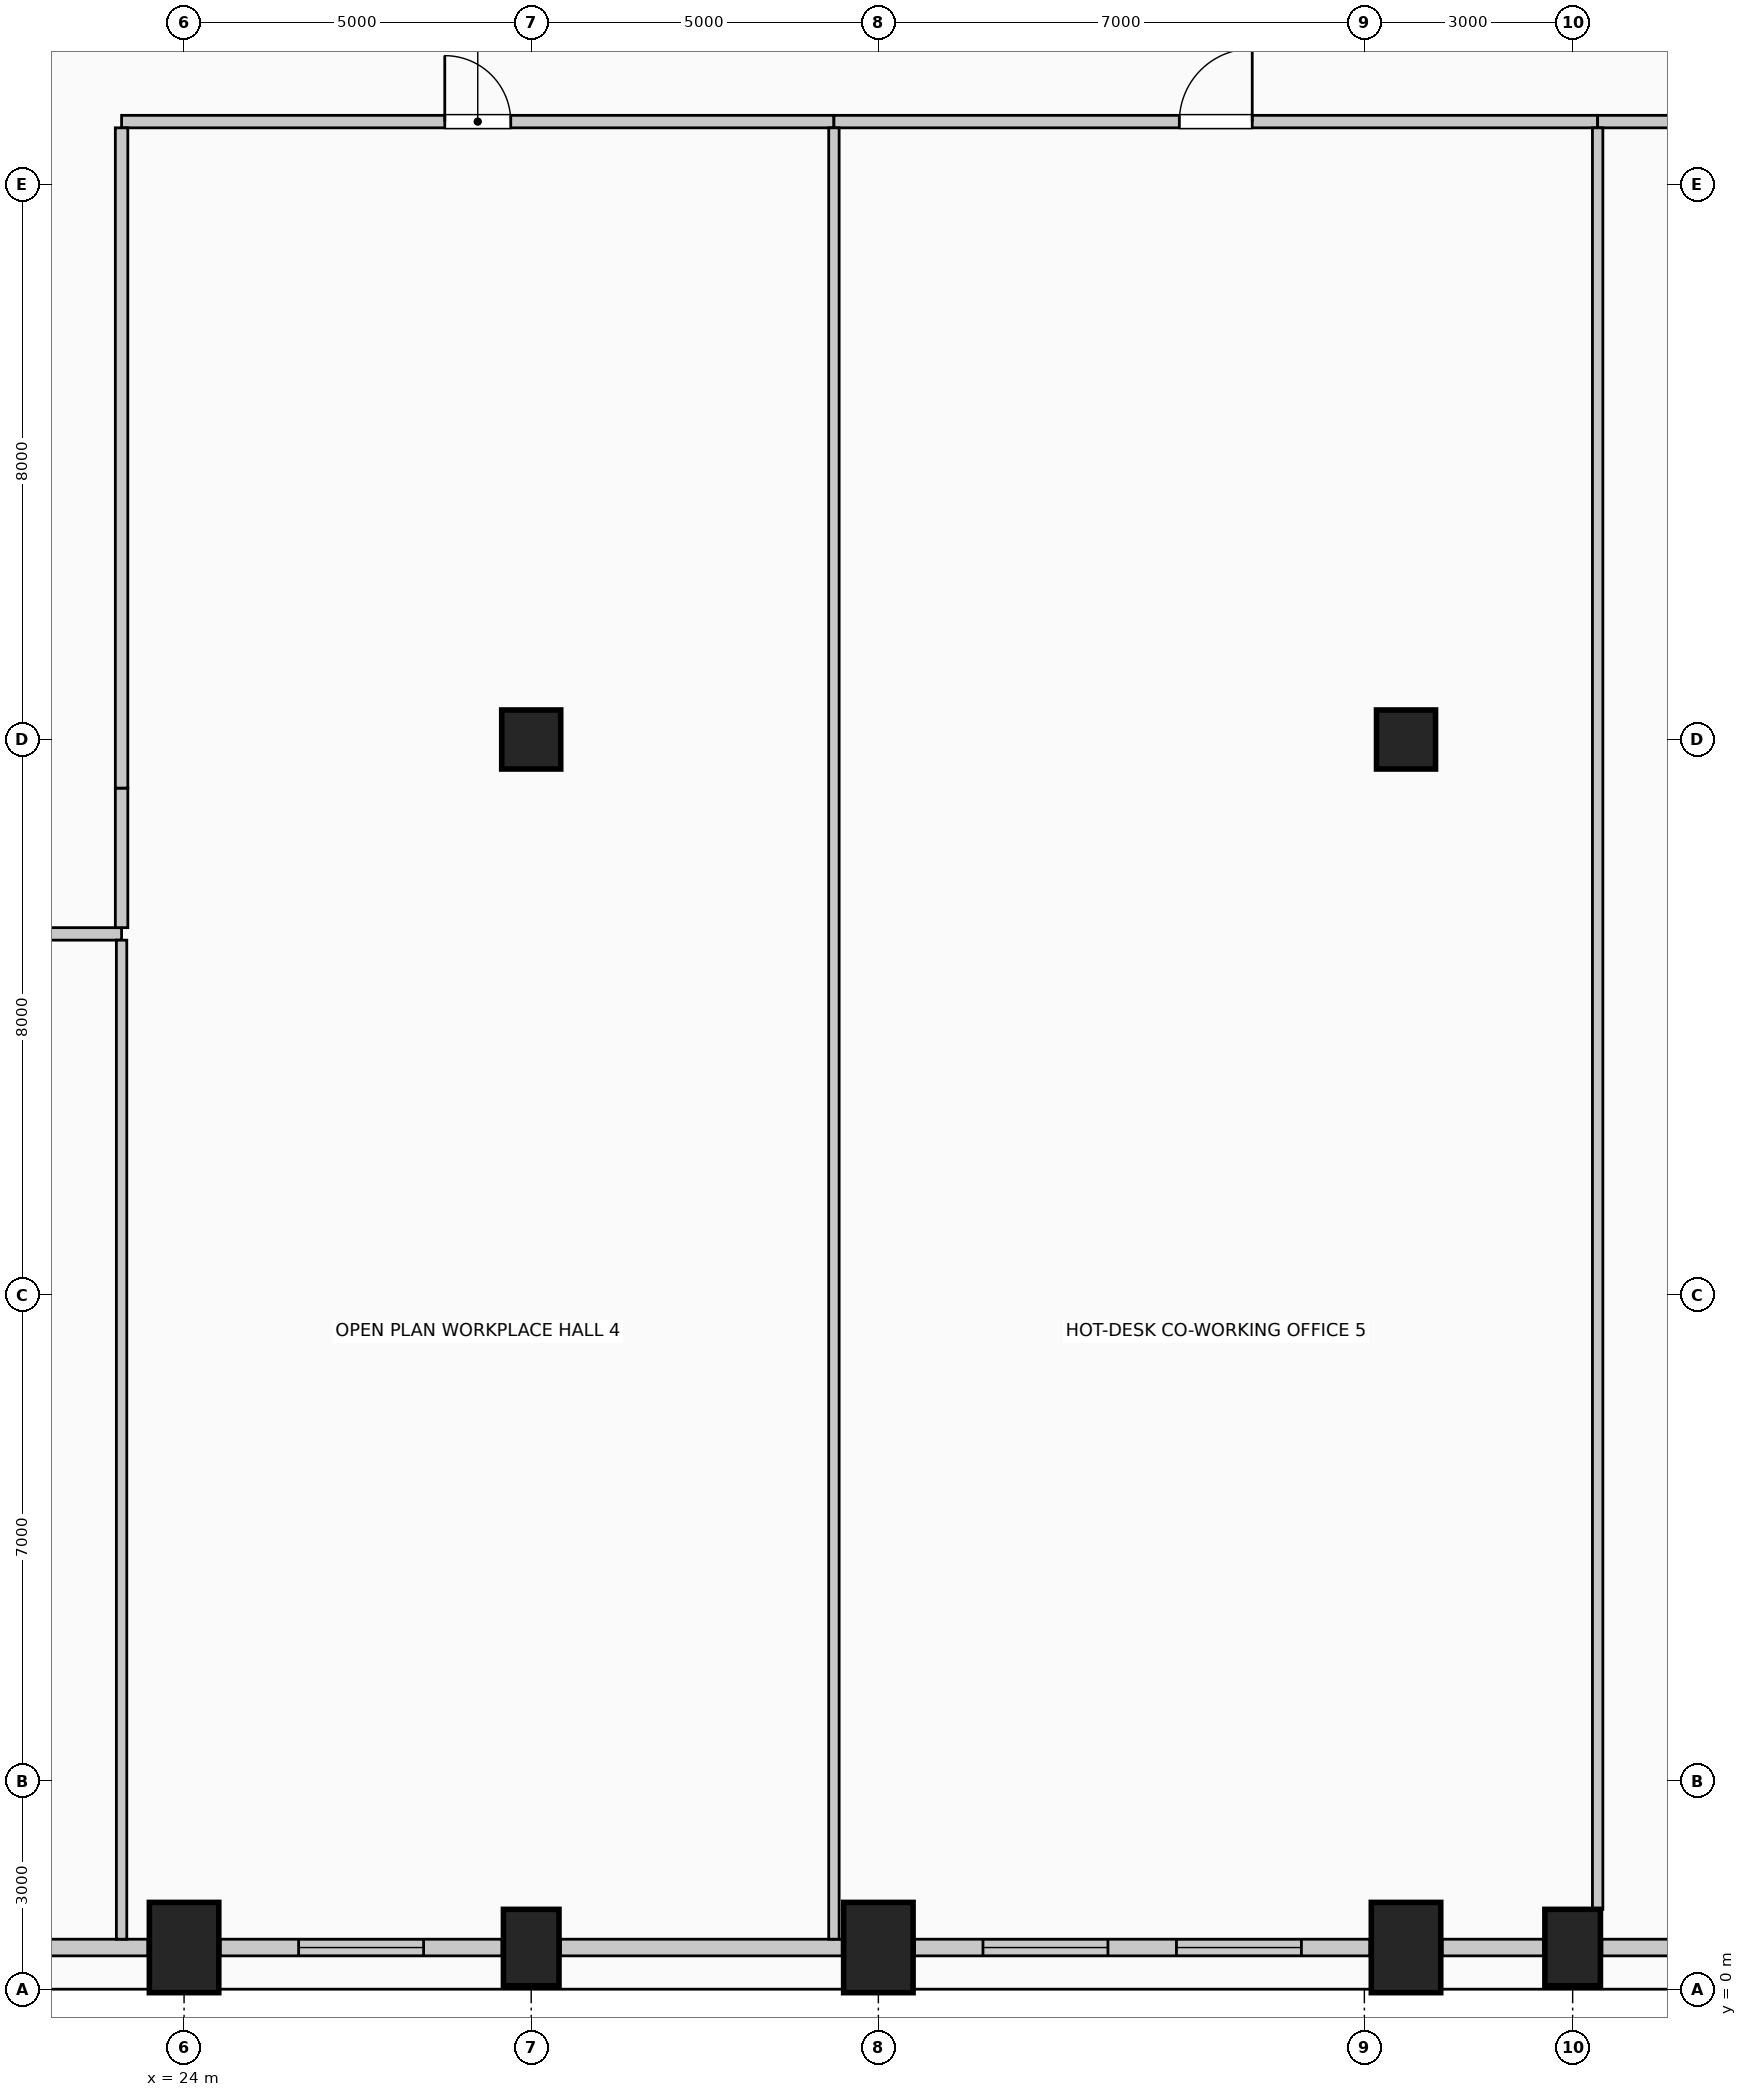
"""IFC4 building model, lengths in metres.
Left out: names, types, materials, properties, quantities, classifications, styles, units other than length and angle.
Written with IfcOpenShell. Run it as: python <this file> out.ifc"""

import sys

from ifc_helpers import new_model, si_unit, direction, frame, frame_2d, origin, origin_2d, place, context, subcontext, project, spatial, rectangle, circle, extrude, element, fill, save


model = new_model("IFC4")
c1 = context("Model", 3, precision=1e-05, world=origin(), true_north=direction((0.0, 1.0)))
c2 = subcontext(c1, "Body", "Model", "MODEL_VIEW")
j1 = project(units=[si_unit("LENGTHUNIT", "METRE"), si_unit("PLANEANGLEUNIT", "RADIAN")], contexts=[c1])
p1 = place(None, origin())
s1 = spatial("IfcSite", under=j1, at=p1, CompositionType="ELEMENT")
p2 = place(p1, origin())
s2 = spatial("IfcBuilding", under=s1, at=p2, CompositionType="ELEMENT")
p3 = place(p2, frame((0.0, 0.0, 174.6)))
s3 = spatial("IfcBuildingStorey", under=s2, at=p3, CompositionType="ELEMENT", Elevation=174.6)
p4 = place(p3, frame((24.0, 0.6, 0.0), z_axis=(0.0, 0.0, 1.0), x_axis=(1.0, 0.0, 0.0)))
e1 = element("IfcColumn", 1, at=p4, inside=s3, PredefinedType="COLUMN", context=c2, shape_type="SweptSolid", body=[
    extrude(rectangle(XDim=1.0, YDim=1.3, at=origin_2d()), origin(), (0.0, 0.0, 1.0), 4.0),
])
p5 = place(p3, frame((29.0, 0.6, 0.0), z_axis=(0.0, 0.0, 1.0), x_axis=(1.0, 0.0, 0.0)))
e2 = element("IfcColumn", 2, at=p5, inside=s3, PredefinedType="COLUMN", context=c2, shape_type="SweptSolid", body=[
    extrude(rectangle(XDim=0.8, YDim=1.1, at=origin_2d()), origin(), (0.0, 0.0, 1.0), 4.0),
])
for number, where, z_axis, x_axis in (
    (3, (34.0, 0.6, 0.0), (0.0, 0.0, 1.0), (1.0, 0.0, 0.0)),
    (4, (41.6, 0.6, 0.0), (0.0, 0.0, 1.0), (1.0, 0.0, 0.0)),
):
    element("IfcColumn", number, at=place(p3, frame(where, z_axis=z_axis, x_axis=x_axis)), inside=s3, PredefinedType="COLUMN", context=c2, shape_type="SweptSolid", body=[
        extrude(rectangle(XDim=1.0, YDim=1.3, at=origin_2d()), origin(), (0.0, 0.0, 1.0), 4.0),
    ])
p6 = place(p3, frame((44.0, 0.6, 0.0), z_axis=(0.0, 0.0, 1.0), x_axis=(1.0, 0.0, 0.0)))
e5 = element("IfcColumn", 5, at=p6, inside=s3, PredefinedType="COLUMN", context=c2, shape_type="SweptSolid", body=[
    extrude(rectangle(XDim=0.8, YDim=1.1, at=origin_2d()), origin(), (0.0, 0.0, 1.0), 4.0),
])
for number, where, z_axis, x_axis in (
    (6, (29.0, 18.0, 0.0), (0.0, 0.0, 1.0), (1.0, 0.0, 0.0)),
    (7, (41.6, 18.0, 0.0), (0.0, 0.0, 1.0), (1.0, 0.0, 0.0)),
):
    element("IfcColumn", number, at=place(p3, frame(where, z_axis=z_axis, x_axis=x_axis)), inside=s3, PredefinedType="COLUMN", context=c2, shape_type="SweptSolid", body=[
        extrude(circle(Radius=0.425, at=origin_2d()), origin(), (0.0, 0.0, 1.0), 4.0),
    ])
p7 = place(p3, frame((23.48, 0.6, 0.0), z_axis=(0.0, 0.0, 1.0), x_axis=(-1.0, 0.0, 0.0)))
e8 = element("IfcWall", 8, at=p7, inside=s3, PredefinedType="SOLIDWALL", context=c2, shape_type="SweptSolid", body=[
    extrude(rectangle(XDim=6.56, YDim=0.24, at=frame_2d((3.28, 0.0))), origin(), (0.0, 0.0, 1.0), 2.975),
])
p8 = place(p7, frame((3.773, 0.0, 0.42)))
e9 = element("IfcOpeningElement", 9, at=p8, cuts=e8, PredefinedType="OPENING", context=c2, shape_type="SweptSolid", body=[
    extrude(rectangle(XDim=1.8, YDim=2.2, at=frame_2d((0.9, 1.1))), frame((0.0, 0.13, 0.0), z_axis=(0.0, -1.0, 0.0), x_axis=(1.0, 0.0, 0.0)), (0.0, 0.0, 1.0), 0.26),
])
p9 = place(p3, frame((28.58, 0.6, 0.0), z_axis=(0.0, 0.0, 1.0), x_axis=(-1.0, 0.0, 0.0)))
e10 = element("IfcWall", 10, at=p9, inside=s3, PredefinedType="SOLIDWALL", context=c2, shape_type="SweptSolid", body=[
    extrude(rectangle(XDim=4.06, YDim=0.24, at=frame_2d((2.03, 0.0))), origin(), (0.0, 0.0, 1.0), 2.975),
])
p10 = place(p9, frame((1.13, 0.0, 0.42)))
e11 = element("IfcOpeningElement", 11, at=p10, cuts=e10, PredefinedType="OPENING", context=c2, shape_type="SweptSolid", body=[
    extrude(rectangle(XDim=1.8, YDim=2.2, at=frame_2d((0.9, 1.1))), frame((0.0, 0.13, 0.0), z_axis=(0.0, -1.0, 0.0), x_axis=(1.0, 0.0, 0.0)), (0.0, 0.0, 1.0), 0.26),
])
p11 = place(p3, frame((33.48, 0.6, 0.0), z_axis=(0.0, 0.0, 1.0), x_axis=(-1.0, 0.0, 0.0)))
e12 = element("IfcWall", 12, at=p11, inside=s3, PredefinedType="SOLIDWALL", context=c2, shape_type="SweptSolid", body=[
    extrude(rectangle(XDim=4.06, YDim=0.24, at=frame_2d((2.03, 0.0))), origin(), (0.0, 0.0, 1.0), 2.975),
])
p12 = place(p3, frame((41.08, 0.6, 0.0), z_axis=(0.0, 0.0, 1.0), x_axis=(-1.0, 0.0, 0.0)))
e13 = element("IfcWall", 13, at=p12, inside=s3, PredefinedType="SOLIDWALL", context=c2, shape_type="SweptSolid", body=[
    extrude(rectangle(XDim=6.56, YDim=0.24, at=frame_2d((3.28, 0.0))), origin(), (0.0, 0.0, 1.0), 2.975),
])
p13 = place(p12, frame((0.987, 0.0, 0.42)))
e14 = element("IfcOpeningElement", 14, at=p13, cuts=e13, PredefinedType="OPENING", context=c2, shape_type="SweptSolid", body=[
    extrude(rectangle(XDim=1.8, YDim=2.2, at=frame_2d((0.9, 1.1))), frame((0.0, 0.13, 0.0), z_axis=(0.0, -1.0, 0.0), x_axis=(1.0, 0.0, 0.0)), (0.0, 0.0, 1.0), 0.26),
])
p14 = place(p12, frame((3.773, 0.0, 0.42)))
e15 = element("IfcOpeningElement", 15, at=p14, cuts=e13, PredefinedType="OPENING", context=c2, shape_type="SweptSolid", body=[
    extrude(rectangle(XDim=1.8, YDim=2.2, at=frame_2d((0.9, 1.1))), frame((0.0, 0.13, 0.0), z_axis=(0.0, -1.0, 0.0), x_axis=(1.0, 0.0, 0.0)), (0.0, 0.0, 1.0), 0.26),
])
p15 = place(p3, frame((43.58, 0.6, 0.0), z_axis=(0.0, 0.0, 1.0), x_axis=(-1.0, 0.0, 0.0)))
e16 = element("IfcWall", 16, at=p15, inside=s3, PredefinedType="SOLIDWALL", context=c2, shape_type="SweptSolid", body=[
    extrude(rectangle(XDim=1.46, YDim=0.24, at=frame_2d((0.73, 0.0))), origin(), (0.0, 0.0, 1.0), 2.975),
])
p16 = place(p3, frame((49.08, 0.6, 0.0), z_axis=(0.0, 0.0, 1.0), x_axis=(-1.0, 0.0, 0.0)))
e17 = element("IfcWall", 17, at=p16, inside=s3, PredefinedType="SOLIDWALL", context=c2, shape_type="SweptSolid", body=[
    extrude(rectangle(XDim=4.66, YDim=0.24, at=frame_2d((2.33, 0.0))), origin(), (0.0, 0.0, 1.0), 2.975),
])
p17 = place(p3, frame((13.56, 15.2, 0.0), z_axis=(0.0, 0.0, 1.0), x_axis=(1.0, 0.0, 0.0)))
e18 = element("IfcWall", 18, at=p17, inside=s3, PredefinedType="PARTITIONING", context=c2, shape_type="SweptSolid", body=[
    extrude(rectangle(XDim=9.54, YDim=0.18, at=frame_2d((4.77, 0.0))), origin(), (0.0, 0.0, 1.0), 3.725),
])
p18 = place(p17, frame((4.295, 0.0, 0.0)))
e19 = element("IfcOpeningElement", 19, at=p18, cuts=e18, PredefinedType="OPENING", context=c2, shape_type="SweptSolid", body=[
    extrude(rectangle(XDim=0.95, YDim=2.15, at=frame_2d((0.475, 1.075))), frame((0.0, 0.1, 0.0), z_axis=(0.0, -1.0, 0.0), x_axis=(1.0, 0.0, 0.0)), (0.0, 0.0, 1.0), 0.2),
])
p19 = place(p3, frame((23.1, 26.9, 0.0), z_axis=(0.0, 0.0, 1.0), x_axis=(1.0, 0.0, 0.0)))
e20 = element("IfcWall", 20, at=p19, inside=s3, PredefinedType="PARTITIONING", context=c2, shape_type="SweptSolid", body=[
    extrude(rectangle(XDim=10.26, YDim=0.18, at=frame_2d((5.13, 0.0))), origin(), (0.0, 0.0, 1.0), 3.725),
])
p20 = place(p19, frame((4.655, 0.0, 0.0)))
e21 = element("IfcOpeningElement", 21, at=p20, cuts=e20, PredefinedType="OPENING", context=c2, shape_type="SweptSolid", body=[
    extrude(rectangle(XDim=0.95, YDim=2.15, at=frame_2d((0.475, 1.075))), frame((0.0, 0.1, 0.0), z_axis=(0.0, -1.0, 0.0), x_axis=(1.0, 0.0, 0.0)), (0.0, 0.0, 1.0), 0.2),
])
p21 = place(p3, frame((33.36, 26.9, 0.0), z_axis=(0.0, 0.0, 1.0), x_axis=(1.0, 0.0, 0.0)))
e22 = element("IfcWall", 22, at=p21, inside=s3, PredefinedType="PARTITIONING", context=c2, shape_type="SweptSolid", body=[
    extrude(rectangle(XDim=11.0, YDim=0.18, at=frame_2d((5.5, 0.0))), origin(), (0.0, 0.0, 1.0), 3.725),
])
p22 = place(p21, frame((4.975, 0.0, 0.0)))
e23 = element("IfcOpeningElement", 23, at=p22, cuts=e22, PredefinedType="OPENING", context=c2, shape_type="SweptSolid", body=[
    extrude(rectangle(XDim=1.05, YDim=2.15, at=frame_2d((0.525, 1.075))), frame((0.0, 0.1, 0.0), z_axis=(0.0, -1.0, 0.0), x_axis=(1.0, 0.0, 0.0)), (0.0, 0.0, 1.0), 0.2),
])
p23 = place(p3, frame((44.36, 26.9, 0.0), z_axis=(0.0, 0.0, 1.0), x_axis=(1.0, 0.0, 0.0)))
e24 = element("IfcWall", 24, at=p23, inside=s3, PredefinedType="PARTITIONING", context=c2, shape_type="SweptSolid", body=[
    extrude(rectangle(XDim=12.92, YDim=0.18, at=frame_2d((6.46, 0.0))), origin(), (0.0, 0.0, 1.0), 3.725),
])
p24 = place(p23, frame((5.985, 0.0, 0.0)))
e25 = element("IfcOpeningElement", 25, at=p24, cuts=e24, PredefinedType="OPENING", context=c2, shape_type="SweptSolid", body=[
    extrude(rectangle(XDim=0.95, YDim=2.15, at=frame_2d((0.475, 1.075))), frame((0.0, 0.1, 0.0), z_axis=(0.0, -1.0, 0.0), x_axis=(1.0, 0.0, 0.0)), (0.0, 0.0, 1.0), 0.2),
])
p25 = place(p3, frame((23.1, 0.72, 0.0), z_axis=(0.0, 0.0, 1.0), x_axis=(0.0, 1.0, 0.0)))
e26 = element("IfcWall", 26, at=p25, inside=s3, PredefinedType="PARTITIONING", context=c2, shape_type="SweptSolid", body=[
    extrude(rectangle(XDim=14.39, YDim=0.15, at=frame_2d((7.195, 0.0))), origin(), (0.0, 0.0, 1.0), 3.725),
])
p26 = place(p3, frame((23.1, 15.29, 0.0), z_axis=(0.0, 0.0, 1.0), x_axis=(0.0, 1.0, 0.0)))
e27 = element("IfcWall", 27, at=p26, inside=s3, PredefinedType="PARTITIONING", context=c2, shape_type="SweptSolid", body=[
    extrude(rectangle(XDim=2.01, YDim=0.18, at=frame_2d((1.005, 0.0))), origin(), (0.0, 0.0, 1.0), 3.725),
])
p27 = place(p3, frame((23.1, 17.3, 0.0), z_axis=(0.0, 0.0, 1.0), x_axis=(0.0, 1.0, 0.0)))
e28 = element("IfcWall", 28, at=p27, inside=s3, PredefinedType="PARTITIONING", context=c2, shape_type="SweptSolid", body=[
    extrude(rectangle(XDim=9.51, YDim=0.18, at=frame_2d((4.755, 0.0))), origin(), (0.0, 0.0, 1.0), 3.725),
])
p28 = place(p3, frame((33.36, 0.72, 0.0), z_axis=(0.0, 0.0, 1.0), x_axis=(0.0, 1.0, 0.0)))
e29 = element("IfcWall", 29, at=p28, inside=s3, PredefinedType="PARTITIONING", context=c2, shape_type="SweptSolid", body=[
    extrude(rectangle(XDim=26.09, YDim=0.15, at=frame_2d((13.045, 0.0))), origin(), (0.0, 0.0, 1.0), 3.725),
])
p29 = place(p3, frame((44.36, 1.15, 0.0), z_axis=(0.0, 0.0, 1.0), x_axis=(0.0, 1.0, 0.0)))
e30 = element("IfcWall", 30, at=p29, inside=s3, PredefinedType="PARTITIONING", context=c2, shape_type="SweptSolid", body=[
    extrude(rectangle(XDim=25.66, YDim=0.15, at=frame_2d((12.83, 0.0))), origin(), (0.0, 0.0, 1.0), 3.725),
])
p30 = place(p10, origin())
e31 = element("IfcWindow", 31, at=p30, inside=s3, PartitioningType="SINGLE_PANEL", PredefinedType="WINDOW", context=c2, shape_type="SweptSolid", body=[
    extrude(rectangle(XDim=1.8, YDim=2.2, at=frame_2d((0.9, 1.1))), frame((0.0, 0.03, 0.0), z_axis=(0.0, -1.0, 0.0), x_axis=(1.0, 0.0, 0.0)), (0.0, 0.0, 1.0), 0.06),
])
fill(e11, e31)
p31 = place(p13, origin())
e32 = element("IfcWindow", 32, at=p31, inside=s3, PartitioningType="SINGLE_PANEL", PredefinedType="WINDOW", context=c2, shape_type="SweptSolid", body=[
    extrude(rectangle(XDim=1.8, YDim=2.2, at=frame_2d((0.9, 1.1))), frame((0.0, 0.03, 0.0), z_axis=(0.0, -1.0, 0.0), x_axis=(1.0, 0.0, 0.0)), (0.0, 0.0, 1.0), 0.06),
])
fill(e14, e32)
p32 = place(p14, origin())
e33 = element("IfcWindow", 33, at=p32, inside=s3, PartitioningType="SINGLE_PANEL", PredefinedType="WINDOW", context=c2, shape_type="SweptSolid", body=[
    extrude(rectangle(XDim=1.8, YDim=2.2, at=frame_2d((0.9, 1.1))), frame((0.0, 0.03, 0.0), z_axis=(0.0, -1.0, 0.0), x_axis=(1.0, 0.0, 0.0)), (0.0, 0.0, 1.0), 0.06),
])
fill(e15, e33)
p33 = place(p20, origin())
e34 = element("IfcDoor", 34, at=p33, inside=s3, OperationType="SINGLE_SWING_LEFT", PredefinedType="DOOR", context=c2, shape_type="SweptSolid", body=[
    extrude(rectangle(XDim=0.95, YDim=2.15, at=frame_2d((0.475, 1.075))), frame((0.0, 0.025, 0.0), z_axis=(0.0, -1.0, 0.0), x_axis=(1.0, 0.0, 0.0)), (0.0, 0.0, 1.0), 0.05),
])
fill(e21, e34)
p34 = place(p22, origin())
e35 = element("IfcDoor", 35, at=p34, inside=s3, OperationType="SINGLE_SWING_RIGHT", PredefinedType="DOOR", context=c2, shape_type="SweptSolid", body=[
    extrude(rectangle(XDim=1.05, YDim=2.15, at=frame_2d((0.525, 1.075))), frame((0.0, 0.025, 0.0), z_axis=(0.0, -1.0, 0.0), x_axis=(1.0, 0.0, 0.0)), (0.0, 0.0, 1.0), 0.05),
])
fill(e23, e35)
save(model, sys.argv[1])
